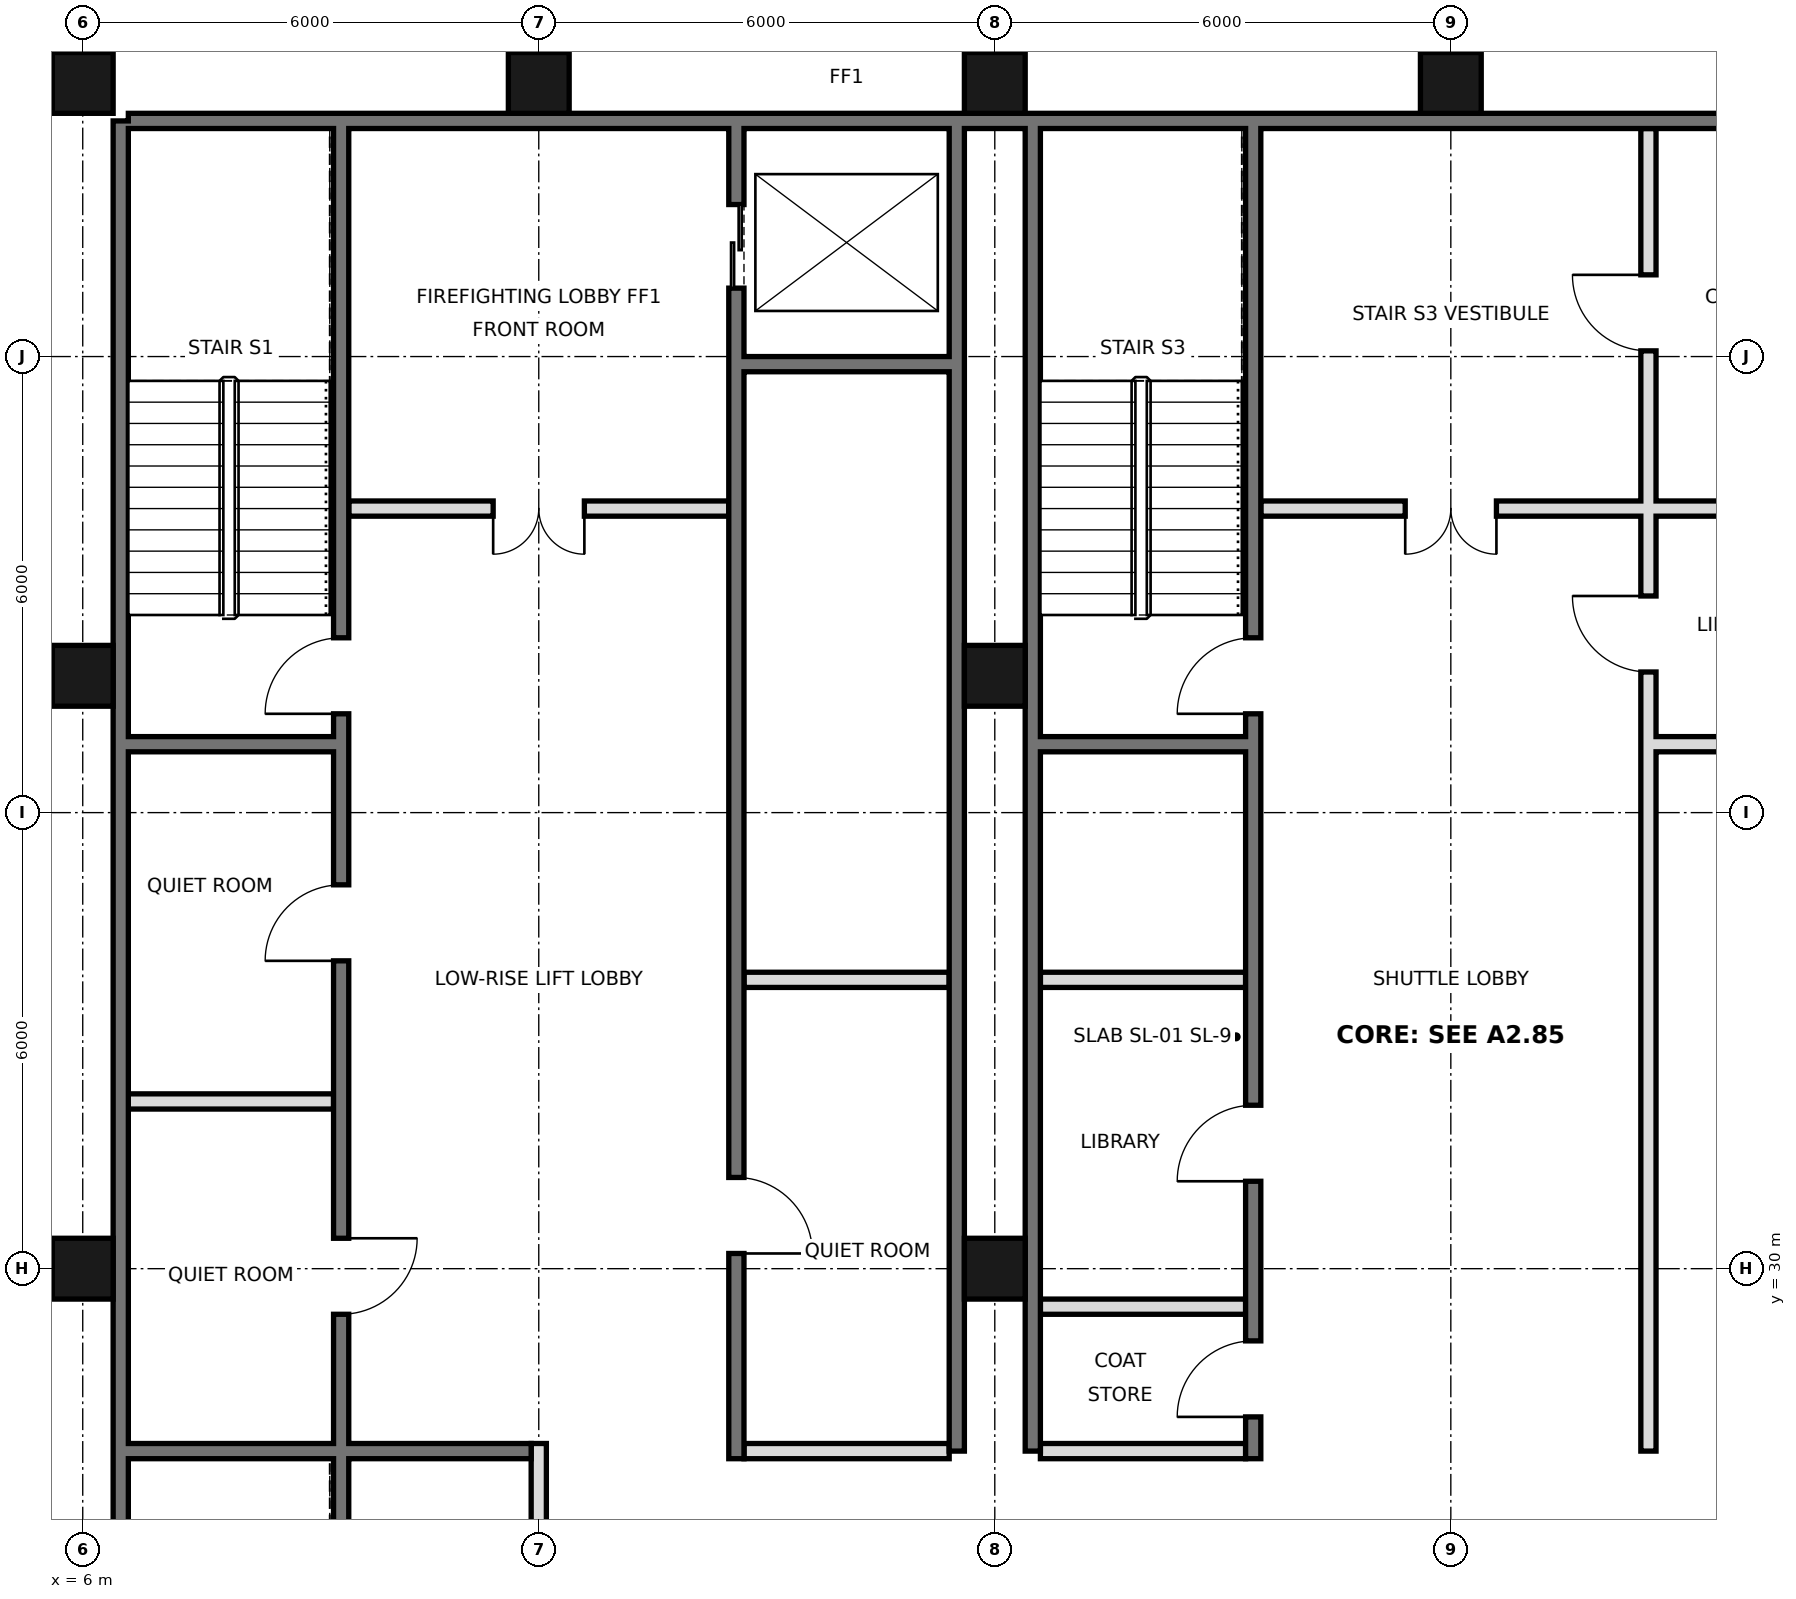
"""IFC4 building model, lengths in metres.
Left out: names, types, materials, properties, quantities, classifications, styles, units other than length and angle.
Written with IfcOpenShell. Run it as: python <this file> out.ifc"""

import sys

from ifc_helpers import new_model, si_unit, direction, frame, frame_2d, origin, origin_2d, place, context, subcontext, project, spatial, rectangle, hollow_rectangle, extrude, element, fill, save


model = new_model("IFC4")
c1 = context("Model", 3, precision=1e-05, world=origin(), true_north=direction((0.0, 1.0)))
c2 = subcontext(c1, "Body", "Model", "MODEL_VIEW")
j1 = project(units=[si_unit("LENGTHUNIT", "METRE"), si_unit("PLANEANGLEUNIT", "RADIAN")], contexts=[c1])
p1 = place(None, origin())
s1 = spatial("IfcSite", under=j1, at=p1, CompositionType="ELEMENT")
p2 = place(p1, origin())
s2 = spatial("IfcBuilding", under=s1, at=p2, CompositionType="ELEMENT")
p3 = place(p2, frame((0.0, 0.0, 341.8)))
s3 = spatial("IfcBuildingStorey", under=s2, at=p3, CompositionType="ELEMENT", Elevation=341.8)
for number, where, z_axis, x_axis in (
    (1, (6.0, 30.0, 0.0), (0.0, 0.0, 1.0), (1.0, 0.0, 0.0)),
    (2, (6.0, 37.8, 0.0), (0.0, 0.0, 1.0), (1.0, 0.0, 0.0)),
    (3, (6.0, 45.6, 0.0), (0.0, 0.0, 1.0), (1.0, 0.0, 0.0)),
    (4, (12.0, 45.6, 0.0), (0.0, 0.0, 1.0), (1.0, 0.0, 0.0)),
    (5, (18.0, 30.0, 0.0), (0.0, 0.0, 1.0), (1.0, 0.0, 0.0)),
    (6, (18.0, 37.8, 0.0), (0.0, 0.0, 1.0), (1.0, 0.0, 0.0)),
    (7, (18.0, 45.6, 0.0), (0.0, 0.0, 1.0), (1.0, 0.0, 0.0)),
    (8, (24.0, 45.6, 0.0), (0.0, 0.0, 1.0), (1.0, 0.0, 0.0)),
):
    element("IfcColumn", number, at=place(p3, frame(where, z_axis=z_axis, x_axis=x_axis)), inside=s3, PredefinedType="COLUMN", context=c2, shape_type="SweptSolid", body=[
        extrude(hollow_rectangle(XDim=0.8, YDim=0.8, WallThickness=0.025, at=origin_2d()), origin(), (0.0, 0.0, 1.0), 4.0),
    ])
p4 = place(p3, frame((6.5, 21.6, 0.0), z_axis=(0.0, 0.0, 1.0), x_axis=(0.0, 1.0, 0.0)))
e9 = element("IfcWall", 9, at=p4, inside=s3, PredefinedType="SOLIDWALL", context=c2, shape_type="SweptSolid", body=[
    extrude(rectangle(XDim=23.5, YDim=0.2, at=frame_2d((11.75, 0.0))), origin(), (0.0, 0.0, 1.0), 3.75),
])
p5 = place(p3, frame((6.6, 45.1, 0.0), z_axis=(0.0, 0.0, 1.0), x_axis=(1.0, 0.0, 0.0)))
e10 = element("IfcWall", 10, at=p5, inside=s3, PredefinedType="SOLIDWALL", context=c2, shape_type="SweptSolid", body=[
    extrude(rectangle(XDim=34.8, YDim=0.2, at=frame_2d((17.4, 0.0))), origin(), (0.0, 0.0, 1.0), 3.75),
])
for number, where, z_axis, x_axis in (
    (11, (17.5, 27.6, 0.0), (0.0, 0.0, 1.0), (0.0, 1.0, 0.0)),
    (12, (18.5, 27.6, 0.0), (0.0, 0.0, 1.0), (0.0, 1.0, 0.0)),
):
    element("IfcWall", number, at=place(p3, frame(where, z_axis=z_axis, x_axis=x_axis)), inside=s3, PredefinedType="SOLIDWALL", context=c2, shape_type="SweptSolid", body=[
        extrude(rectangle(XDim=17.5, YDim=0.2, at=frame_2d((8.75, 0.0))), origin(), (0.0, 0.0, 1.0), 3.75),
    ])
p6 = place(p3, frame((12.0, 21.5, 0.0), z_axis=(0.0, 0.0, 1.0), x_axis=(0.0, 1.0, 0.0)))
e13 = element("IfcWall", 13, at=p6, inside=s3, PredefinedType="PARTITIONING", context=c2, shape_type="SweptSolid", body=[
    extrude(rectangle(XDim=6.2, YDim=0.2, at=frame_2d((3.1, 0.0))), origin(), (0.0, 0.0, 1.0), 3.75),
])
p7 = place(p3, frame((14.6, 27.5, 0.0), z_axis=(0.0, 0.0, 1.0), x_axis=(0.0, 1.0, 0.0)))
e14 = element("IfcWall", 14, at=p7, inside=s3, PredefinedType="SOLIDWALL", context=c2, shape_type="SweptSolid", body=[
    extrude(rectangle(XDim=17.5, YDim=0.2, at=frame_2d((8.75, 0.0))), origin(), (0.0, 0.0, 1.0), 3.75),
])
p8 = place(p7, frame((15.4, 0.0, 0.0)))
e15 = element("IfcOpeningElement", 15, at=p8, cuts=e14, PredefinedType="OPENING", context=c2, shape_type="SweptSolid", body=[
    extrude(rectangle(XDim=1.1, YDim=2.1, at=frame_2d((0.55, 1.05))), frame((0.0, 0.11, 0.0), z_axis=(0.0, -1.0, 0.0), x_axis=(1.0, 0.0, 0.0)), (0.0, 0.0, 1.0), 0.22),
])
p9 = place(p7, frame((2.7, 0.0, 0.0)))
e16 = element("IfcOpeningElement", 16, at=p9, cuts=e14, PredefinedType="OPENING", context=c2, shape_type="SweptSolid", body=[
    extrude(rectangle(XDim=1.0, YDim=2.1, at=frame_2d((0.5, 1.05))), frame((0.0, 0.11, 0.0), z_axis=(0.0, -1.0, 0.0), x_axis=(1.0, 0.0, 0.0)), (0.0, 0.0, 1.0), 0.22),
])
p10 = place(p3, frame((21.4, 27.5, 0.0), z_axis=(0.0, 0.0, 1.0), x_axis=(0.0, 1.0, 0.0)))
e17 = element("IfcWall", 17, at=p10, inside=s3, PredefinedType="SOLIDWALL", context=c2, shape_type="SweptSolid", body=[
    extrude(rectangle(XDim=17.5, YDim=0.2, at=frame_2d((8.75, 0.0))), origin(), (0.0, 0.0, 1.0), 3.75),
])
p11 = place(p10, frame((0.55, 0.0, 0.0)))
e18 = element("IfcOpeningElement", 18, at=p11, cuts=e17, PredefinedType="OPENING", context=c2, shape_type="SweptSolid", body=[
    extrude(rectangle(XDim=1.0, YDim=2.1, at=frame_2d((0.5, 1.05))), frame((0.0, 0.11, 0.0), z_axis=(0.0, -1.0, 0.0), x_axis=(1.0, 0.0, 0.0)), (0.0, 0.0, 1.0), 0.22),
])
p12 = place(p10, frame((3.65, 0.0, 0.0)))
e19 = element("IfcOpeningElement", 19, at=p12, cuts=e17, PredefinedType="OPENING", context=c2, shape_type="SweptSolid", body=[
    extrude(rectangle(XDim=1.0, YDim=2.1, at=frame_2d((0.5, 1.05))), frame((0.0, 0.11, 0.0), z_axis=(0.0, -1.0, 0.0), x_axis=(1.0, 0.0, 0.0)), (0.0, 0.0, 1.0), 0.22),
])
p13 = place(p10, frame((9.8, 0.0, 0.0)))
e20 = element("IfcOpeningElement", 20, at=p13, cuts=e17, PredefinedType="OPENING", context=c2, shape_type="SweptSolid", body=[
    extrude(rectangle(XDim=1.0, YDim=2.1, at=frame_2d((0.5, 1.05))), frame((0.0, 0.11, 0.0), z_axis=(0.0, -1.0, 0.0), x_axis=(1.0, 0.0, 0.0)), (0.0, 0.0, 1.0), 0.22),
])
p14 = place(p3, frame((26.6, 27.6, 0.0), z_axis=(0.0, 0.0, 1.0), x_axis=(0.0, 1.0, 0.0)))
e21 = element("IfcWall", 21, at=p14, inside=s3, PredefinedType="PARTITIONING", context=c2, shape_type="SweptSolid", body=[
    extrude(rectangle(XDim=17.4, YDim=0.2, at=frame_2d((8.7, 0.0))), origin(), (0.0, 0.0, 1.0), 3.75),
])
p15 = place(p14, frame((10.25, 0.0, 0.0)))
e22 = element("IfcOpeningElement", 22, at=p15, cuts=e21, PredefinedType="OPENING", context=c2, shape_type="SweptSolid", body=[
    extrude(rectangle(XDim=1.0, YDim=2.1, at=frame_2d((0.5, 1.05))), frame((0.0, 0.11, 0.0), z_axis=(0.0, -1.0, 0.0), x_axis=(1.0, 0.0, 0.0)), (0.0, 0.0, 1.0), 0.22),
])
p16 = place(p14, frame((14.475, 0.0, 0.0)))
e23 = element("IfcOpeningElement", 23, at=p16, cuts=e21, PredefinedType="OPENING", context=c2, shape_type="SweptSolid", body=[
    extrude(rectangle(XDim=1.0, YDim=2.1, at=frame_2d((0.5, 1.05))), frame((0.0, 0.11, 0.0), z_axis=(0.0, -1.0, 0.0), x_axis=(1.0, 0.0, 0.0)), (0.0, 0.0, 1.0), 0.22),
])
p17 = place(p3, frame((9.4, 21.5, 0.0), z_axis=(0.0, 0.0, 1.0), x_axis=(0.0, 1.0, 0.0)))
e24 = element("IfcWall", 24, at=p17, inside=s3, PredefinedType="SOLIDWALL", context=c2, shape_type="SweptSolid", body=[
    extrude(rectangle(XDim=23.5, YDim=0.2, at=frame_2d((11.75, 0.0))), origin(), (0.0, 0.0, 1.0), 3.75),
])
p18 = place(p17, frame((7.9, 0.0, 0.0)))
e25 = element("IfcOpeningElement", 25, at=p18, cuts=e24, PredefinedType="OPENING", context=c2, shape_type="SweptSolid", body=[
    extrude(rectangle(XDim=1.0, YDim=2.1, at=frame_2d((0.5, 1.05))), frame((0.0, 0.11, 0.0), z_axis=(0.0, -1.0, 0.0), x_axis=(1.0, 0.0, 0.0)), (0.0, 0.0, 1.0), 0.22),
])
p19 = place(p17, frame((12.55, 0.0, 0.0)))
e26 = element("IfcOpeningElement", 26, at=p19, cuts=e24, PredefinedType="OPENING", context=c2, shape_type="SweptSolid", body=[
    extrude(rectangle(XDim=1.0, YDim=2.1, at=frame_2d((0.5, 1.05))), frame((0.0, 0.11, 0.0), z_axis=(0.0, -1.0, 0.0), x_axis=(1.0, 0.0, 0.0)), (0.0, 0.0, 1.0), 0.22),
])
p20 = place(p17, frame((15.8, 0.0, 0.0)))
e27 = element("IfcOpeningElement", 27, at=p20, cuts=e24, PredefinedType="OPENING", context=c2, shape_type="SweptSolid", body=[
    extrude(rectangle(XDim=1.0, YDim=2.1, at=frame_2d((0.5, 1.05))), frame((0.0, 0.11, 0.0), z_axis=(0.0, -1.0, 0.0), x_axis=(1.0, 0.0, 0.0)), (0.0, 0.0, 1.0), 0.22),
])
p21 = place(p17, frame((0.275, 0.0, 0.0)))
e28 = element("IfcOpeningElement", 28, at=p21, cuts=e24, PredefinedType="OPENING", context=c2, shape_type="SweptSolid", body=[
    extrude(rectangle(XDim=0.9, YDim=2.1, at=frame_2d((0.45, 1.05))), frame((0.0, 0.11, 0.0), z_axis=(0.0, -1.0, 0.0), x_axis=(1.0, 0.0, 0.0)), (0.0, 0.0, 1.0), 0.22),
])
for number, where, z_axis, x_axis in (
    (29, (14.7, 27.6, 0.0), (0.0, 0.0, 1.0), (1.0, 0.0, 0.0)),
    (30, (18.6, 27.6, 0.0), (0.0, 0.0, 1.0), (1.0, 0.0, 0.0)),
):
    element("IfcWall", number, at=place(p3, frame(where, z_axis=z_axis, x_axis=x_axis)), inside=s3, PredefinedType="PARTITIONING", context=c2, shape_type="SweptSolid", body=[
        extrude(rectangle(XDim=2.7, YDim=0.2, at=frame_2d((1.35, 0.0))), origin(), (0.0, 0.0, 1.0), 3.75),
    ])
p22 = place(p3, frame((6.6, 27.6, 0.0), z_axis=(0.0, 0.0, 1.0), x_axis=(1.0, 0.0, 0.0)))
e31 = element("IfcWall", 31, at=p22, inside=s3, PredefinedType="SOLIDWALL", context=c2, shape_type="SweptSolid", body=[
    extrude(rectangle(XDim=5.3, YDim=0.2, at=frame_2d((2.65, 0.0))), origin(), (0.0, 0.0, 1.0), 3.75),
])
for number, where, z_axis, x_axis in (
    (32, (18.6, 29.5, 0.0), (0.0, 0.0, 1.0), (1.0, 0.0, 0.0)),
    (33, (6.6, 32.2, 0.0), (0.0, 0.0, 1.0), (1.0, 0.0, 0.0)),
    (34, (14.7, 33.8, 0.0), (0.0, 0.0, 1.0), (1.0, 0.0, 0.0)),
    (35, (18.6, 33.8, 0.0), (0.0, 0.0, 1.0), (1.0, 0.0, 0.0)),
):
    element("IfcWall", number, at=place(p3, frame(where, z_axis=z_axis, x_axis=x_axis)), inside=s3, PredefinedType="PARTITIONING", context=c2, shape_type="SweptSolid", body=[
        extrude(rectangle(XDim=2.7, YDim=0.2, at=frame_2d((1.35, 0.0))), origin(), (0.0, 0.0, 1.0), 3.75),
    ])
p23 = place(p3, frame((18.6, 36.9, 0.0), z_axis=(0.0, 0.0, 1.0), x_axis=(1.0, 0.0, 0.0)))
e36 = element("IfcWall", 36, at=p23, inside=s3, PredefinedType="SOLIDWALL", context=c2, shape_type="SweptSolid", body=[
    extrude(rectangle(XDim=2.7, YDim=0.2, at=frame_2d((1.35, 0.0))), origin(), (0.0, 0.0, 1.0), 3.75),
])
p24 = place(p3, frame((26.7, 36.9, 0.0), z_axis=(0.0, 0.0, 1.0), x_axis=(1.0, 0.0, 0.0)))
e37 = element("IfcWall", 37, at=p24, inside=s3, PredefinedType="PARTITIONING", context=c2, shape_type="SweptSolid", body=[
    extrude(rectangle(XDim=2.7, YDim=0.2, at=frame_2d((1.35, 0.0))), origin(), (0.0, 0.0, 1.0), 3.75),
])
p25 = place(p3, frame((6.6, 36.9, 0.0), z_axis=(0.0, 0.0, 1.0), x_axis=(1.0, 0.0, 0.0)))
e38 = element("IfcWall", 38, at=p25, inside=s3, PredefinedType="SOLIDWALL", context=c2, shape_type="SweptSolid", body=[
    extrude(rectangle(XDim=2.7, YDim=0.2, at=frame_2d((1.35, 0.0))), origin(), (0.0, 0.0, 1.0), 3.75),
])
p26 = place(p3, frame((21.5, 40.0, 0.0), z_axis=(0.0, 0.0, 1.0), x_axis=(1.0, 0.0, 0.0)))
e39 = element("IfcWall", 39, at=p26, inside=s3, PredefinedType="PARTITIONING", context=c2, shape_type="SweptSolid", body=[
    extrude(rectangle(XDim=7.9, YDim=0.2, at=frame_2d((3.95, 0.0))), origin(), (0.0, 0.0, 1.0), 3.75),
])
p27 = place(p26, frame((1.9, 0.0, 0.0)))
e40 = element("IfcOpeningElement", 40, at=p27, cuts=e39, PredefinedType="OPENING", context=c2, shape_type="SweptSolid", body=[
    extrude(rectangle(XDim=1.2, YDim=2.1, at=frame_2d((0.6, 1.05))), frame((0.0, 0.11, 0.0), z_axis=(0.0, -1.0, 0.0), x_axis=(1.0, 0.0, 0.0)), (0.0, 0.0, 1.0), 0.22),
])
p28 = place(p3, frame((9.5, 40.0, 0.0), z_axis=(0.0, 0.0, 1.0), x_axis=(1.0, 0.0, 0.0)))
e41 = element("IfcWall", 41, at=p28, inside=s3, PredefinedType="PARTITIONING", context=c2, shape_type="SweptSolid", body=[
    extrude(rectangle(XDim=5.0, YDim=0.2, at=frame_2d((2.5, 0.0))), origin(), (0.0, 0.0, 1.0), 3.75),
])
p29 = place(p28, frame((1.9, 0.0, 0.0)))
e42 = element("IfcOpeningElement", 42, at=p29, cuts=e41, PredefinedType="OPENING", context=c2, shape_type="SweptSolid", body=[
    extrude(rectangle(XDim=1.2, YDim=2.1, at=frame_2d((0.6, 1.05))), frame((0.0, 0.11, 0.0), z_axis=(0.0, -1.0, 0.0), x_axis=(1.0, 0.0, 0.0)), (0.0, 0.0, 1.0), 0.22),
])
p30 = place(p3, frame((14.7, 41.9, 0.0), z_axis=(0.0, 0.0, 1.0), x_axis=(1.0, 0.0, 0.0)))
e43 = element("IfcWall", 43, at=p30, inside=s3, PredefinedType="SOLIDWALL", context=c2, shape_type="SweptSolid", body=[
    extrude(rectangle(XDim=2.7, YDim=0.2, at=frame_2d((1.35, 0.0))), origin(), (0.0, 0.0, 1.0), 3.75),
])
p31 = place(p29, frame((1.2, 0.0, 0.0), z_axis=(0.0, 0.0, 1.0), x_axis=(-1.0, 0.0, 0.0)))
e44 = element("IfcDoor", 44, at=p31, inside=s3, OperationType="DOUBLE_DOOR_SINGLE_SWING", PredefinedType="DOOR", context=c2, shape_type="SweptSolid", body=[
    extrude(rectangle(XDim=1.2, YDim=2.1, at=frame_2d((0.6, 1.05))), frame((0.0, 0.025, 0.0), z_axis=(0.0, -1.0, 0.0), x_axis=(1.0, 0.0, 0.0)), (0.0, 0.0, 1.0), 0.05),
])
fill(e42, e44)
p32 = place(p27, frame((1.2, 0.0, 0.0), z_axis=(0.0, 0.0, 1.0), x_axis=(-1.0, 0.0, 0.0)))
e45 = element("IfcDoor", 45, at=p32, inside=s3, OperationType="DOUBLE_DOOR_SINGLE_SWING", PredefinedType="DOOR", context=c2, shape_type="SweptSolid", body=[
    extrude(rectangle(XDim=1.2, YDim=2.1, at=frame_2d((0.6, 1.05))), frame((0.0, 0.025, 0.0), z_axis=(0.0, -1.0, 0.0), x_axis=(1.0, 0.0, 0.0)), (0.0, 0.0, 1.0), 0.05),
])
fill(e40, e45)
p33 = place(p8, origin())
e46 = element("IfcDoor", 46, at=p33, inside=s3, OperationType="DOUBLE_DOOR_SLIDING", PredefinedType="DOOR", context=c2, shape_type="SweptSolid", body=[
    extrude(rectangle(XDim=1.1, YDim=2.1, at=frame_2d((0.55, 1.05))), frame((0.0, 0.025, 0.0), z_axis=(0.0, -1.0, 0.0), x_axis=(1.0, 0.0, 0.0)), (0.0, 0.0, 1.0), 0.05),
])
fill(e15, e46)
p34 = place(p11, origin())
e47 = element("IfcDoor", 47, at=p34, inside=s3, OperationType="SINGLE_SWING_LEFT", PredefinedType="DOOR", context=c2, shape_type="SweptSolid", body=[
    extrude(rectangle(XDim=1.0, YDim=2.1, at=frame_2d((0.5, 1.05))), frame((0.0, 0.025, 0.0), z_axis=(0.0, -1.0, 0.0), x_axis=(1.0, 0.0, 0.0)), (0.0, 0.0, 1.0), 0.05),
])
fill(e18, e47)
p35 = place(p12, origin())
e48 = element("IfcDoor", 48, at=p35, inside=s3, OperationType="SINGLE_SWING_LEFT", PredefinedType="DOOR", context=c2, shape_type="SweptSolid", body=[
    extrude(rectangle(XDim=1.0, YDim=2.1, at=frame_2d((0.5, 1.05))), frame((0.0, 0.025, 0.0), z_axis=(0.0, -1.0, 0.0), x_axis=(1.0, 0.0, 0.0)), (0.0, 0.0, 1.0), 0.05),
])
fill(e19, e48)
p36 = place(p9, frame((1.0, 0.0, 0.0), z_axis=(0.0, 0.0, 1.0), x_axis=(-1.0, 0.0, 0.0)))
e49 = element("IfcDoor", 49, at=p36, inside=s3, OperationType="SINGLE_SWING_RIGHT", PredefinedType="DOOR", context=c2, shape_type="SweptSolid", body=[
    extrude(rectangle(XDim=1.0, YDim=2.1, at=frame_2d((0.5, 1.05))), frame((0.0, 0.025, 0.0), z_axis=(0.0, -1.0, 0.0), x_axis=(1.0, 0.0, 0.0)), (0.0, 0.0, 1.0), 0.05),
])
fill(e16, e49)
p37 = place(p18, origin())
e50 = element("IfcDoor", 50, at=p37, inside=s3, OperationType="SINGLE_SWING_RIGHT", PredefinedType="DOOR", context=c2, shape_type="SweptSolid", body=[
    extrude(rectangle(XDim=1.0, YDim=2.1, at=frame_2d((0.5, 1.05))), frame((0.0, 0.025, 0.0), z_axis=(0.0, -1.0, 0.0), x_axis=(1.0, 0.0, 0.0)), (0.0, 0.0, 1.0), 0.05),
])
fill(e25, e50)
p38 = place(p19, origin())
e51 = element("IfcDoor", 51, at=p38, inside=s3, OperationType="SINGLE_SWING_LEFT", PredefinedType="DOOR", context=c2, shape_type="SweptSolid", body=[
    extrude(rectangle(XDim=1.0, YDim=2.1, at=frame_2d((0.5, 1.05))), frame((0.0, 0.025, 0.0), z_axis=(0.0, -1.0, 0.0), x_axis=(1.0, 0.0, 0.0)), (0.0, 0.0, 1.0), 0.05),
])
fill(e26, e51)
p39 = place(p20, origin())
e52 = element("IfcDoor", 52, at=p39, inside=s3, OperationType="SINGLE_SWING_LEFT", PredefinedType="DOOR", context=c2, shape_type="SweptSolid", body=[
    extrude(rectangle(XDim=1.0, YDim=2.1, at=frame_2d((0.5, 1.05))), frame((0.0, 0.025, 0.0), z_axis=(0.0, -1.0, 0.0), x_axis=(1.0, 0.0, 0.0)), (0.0, 0.0, 1.0), 0.05),
])
fill(e27, e52)
p40 = place(p13, origin())
e53 = element("IfcDoor", 53, at=p40, inside=s3, OperationType="SINGLE_SWING_LEFT", PredefinedType="DOOR", context=c2, shape_type="SweptSolid", body=[
    extrude(rectangle(XDim=1.0, YDim=2.1, at=frame_2d((0.5, 1.05))), frame((0.0, 0.025, 0.0), z_axis=(0.0, -1.0, 0.0), x_axis=(1.0, 0.0, 0.0)), (0.0, 0.0, 1.0), 0.05),
])
fill(e20, e53)
p41 = place(p15, frame((1.0, 0.0, 0.0), z_axis=(0.0, 0.0, 1.0), x_axis=(-1.0, 0.0, 0.0)))
e54 = element("IfcDoor", 54, at=p41, inside=s3, OperationType="SINGLE_SWING_LEFT", PredefinedType="DOOR", context=c2, shape_type="SweptSolid", body=[
    extrude(rectangle(XDim=1.0, YDim=2.1, at=frame_2d((0.5, 1.05))), frame((0.0, 0.025, 0.0), z_axis=(0.0, -1.0, 0.0), x_axis=(1.0, 0.0, 0.0)), (0.0, 0.0, 1.0), 0.05),
])
fill(e22, e54)
p42 = place(p16, frame((1.0, 0.0, 0.0), z_axis=(0.0, 0.0, 1.0), x_axis=(-1.0, 0.0, 0.0)))
e55 = element("IfcDoor", 55, at=p42, inside=s3, OperationType="SINGLE_SWING_LEFT", PredefinedType="DOOR", context=c2, shape_type="SweptSolid", body=[
    extrude(rectangle(XDim=1.0, YDim=2.1, at=frame_2d((0.5, 1.05))), frame((0.0, 0.025, 0.0), z_axis=(0.0, -1.0, 0.0), x_axis=(1.0, 0.0, 0.0)), (0.0, 0.0, 1.0), 0.05),
])
fill(e23, e55)
save(model, sys.argv[1])
